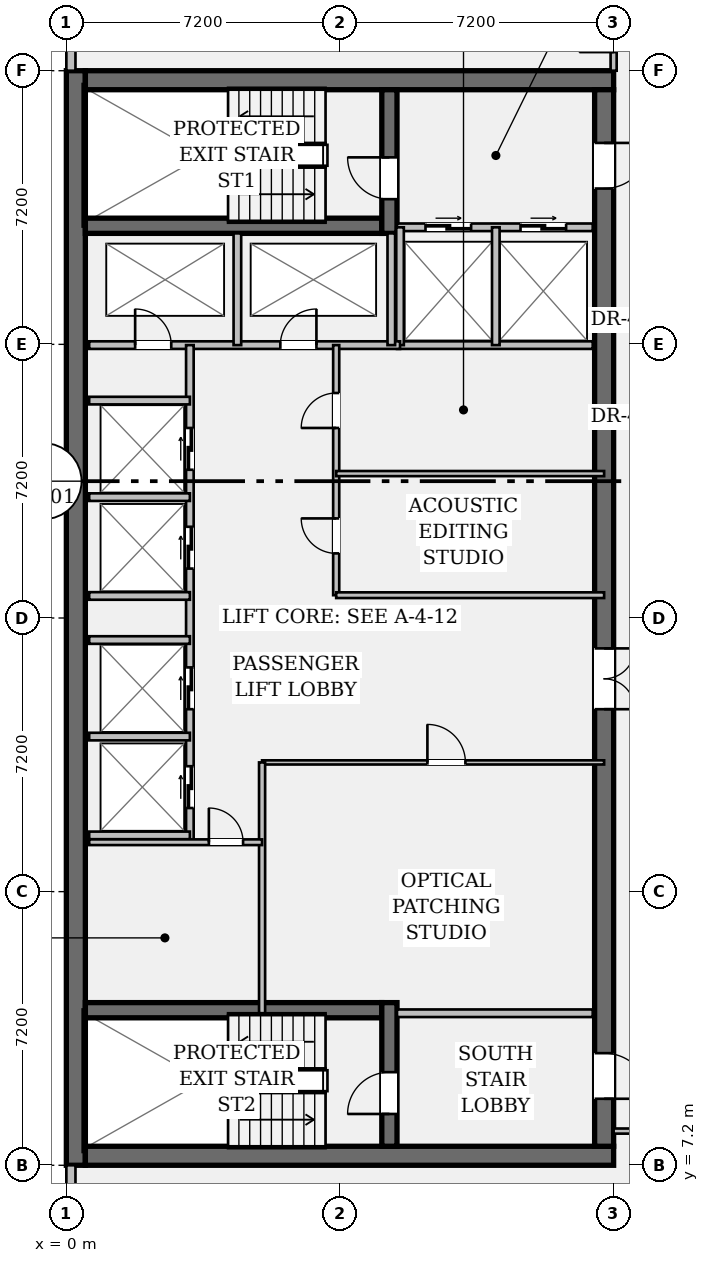
"""IFC4 building model, lengths in metres.
Left out: names, types, materials, properties, quantities, classifications, styles, units other than length and angle.
Written with IfcOpenShell. Run it as: python <this file> out.ifc"""

import sys

from ifc_helpers import new_model, si_unit, direction, frame, frame_2d, origin, place, context, subcontext, project, spatial, rectangle, extrude, element, fill, save


model = new_model("IFC4")
c1 = context("Model", 3, precision=1e-05, world=origin(), true_north=direction((0.0, 1.0)))
c2 = subcontext(c1, "Body", "Model", "MODEL_VIEW")
j1 = project(units=[si_unit("LENGTHUNIT", "METRE"), si_unit("PLANEANGLEUNIT", "RADIAN")], contexts=[c1])
p1 = place(None, origin())
s1 = spatial("IfcSite", under=j1, at=p1, CompositionType="ELEMENT")
p2 = place(p1, origin())
s2 = spatial("IfcBuilding", under=s1, at=p2, CompositionType="ELEMENT")
p3 = place(p2, frame((0.0, 0.0, 201.25)))
s3 = spatial("IfcBuildingStorey", under=s2, at=p3, CompositionType="ELEMENT", Elevation=201.25)
p4 = place(p3, frame((0.25, 7.2, 0.0), z_axis=(0.0, 0.0, 1.0), x_axis=(0.0, 1.0, 0.0)))
e1 = element("IfcWall", 1, at=p4, inside=s3, PredefinedType="SHEAR", context=c2, shape_type="SweptSolid", body=[
    extrude(rectangle(XDim=28.8, YDim=0.5, at=frame_2d((14.4, 0.0))), origin(), (0.0, 0.0, 1.0), 3.24),
])
for number, where, z_axis, x_axis in (
    (2, (0.5, 7.45, 0.0), (0.0, 0.0, 1.0), (1.0, 0.0, 0.0)),
    (3, (0.5, 35.75, 0.0), (0.0, 0.0, 1.0), (1.0, 0.0, 0.0)),
):
    element("IfcWall", number, at=place(p3, frame(where, z_axis=z_axis, x_axis=x_axis)), inside=s3, PredefinedType="SHEAR", context=c2, shape_type="SweptSolid", body=[
        extrude(rectangle(XDim=13.9, YDim=0.5, at=frame_2d((6.95, 0.0))), origin(), (0.0, 0.0, 1.0), 3.24),
    ])
p5 = place(p3, frame((14.15, 35.5, 0.0), z_axis=(0.0, 0.0, 1.0), x_axis=(0.0, -1.0, 0.0)))
e4 = element("IfcWall", 4, at=p5, inside=s3, PredefinedType="SHEAR", context=c2, shape_type="SweptSolid", body=[
    extrude(rectangle(XDim=27.8, YDim=0.5, at=frame_2d((13.9, 0.0))), origin(), (0.0, 0.0, 1.0), 3.24),
])
p6 = place(p5, frame((1.4, 0.0, 0.0)))
e5 = element("IfcOpeningElement", 5, at=p6, cuts=e4, PredefinedType="OPENING", context=c2, shape_type="SweptSolid", body=[
    extrude(rectangle(XDim=1.2, YDim=2.15, at=frame_2d((0.6, 1.075))), frame((0.0, 0.262, 0.0), z_axis=(0.0, -1.0, 0.0), x_axis=(1.0, 0.0, 0.0)), (0.0, 0.0, 1.0), 0.524),
])
p7 = place(p5, frame((25.35, 0.0, 0.0)))
e6 = element("IfcOpeningElement", 6, at=p7, cuts=e4, PredefinedType="OPENING", context=c2, shape_type="SweptSolid", body=[
    extrude(rectangle(XDim=1.2, YDim=2.15, at=frame_2d((0.6, 1.075))), frame((0.0, 0.262, 0.0), z_axis=(0.0, -1.0, 0.0), x_axis=(1.0, 0.0, 0.0)), (0.0, 0.0, 1.0), 0.524),
])
p8 = place(p5, frame((14.7, 0.0, 0.0)))
e7 = element("IfcOpeningElement", 7, at=p8, cuts=e4, PredefinedType="OPENING", context=c2, shape_type="SweptSolid", body=[
    extrude(rectangle(XDim=1.6, YDim=2.2, at=frame_2d((0.8, 1.1))), frame((0.0, 0.262, 0.0), z_axis=(0.0, -1.0, 0.0), x_axis=(1.0, 0.0, 0.0)), (0.0, 0.0, 1.0), 0.524),
])
for number, where, z_axis, x_axis in (
    (8, (0.5, 31.92, 0.0), (0.0, 0.0, 1.0), (1.0, 0.0, 0.0)),
    (9, (0.5, 11.28, 0.0), (0.0, 0.0, 1.0), (1.0, 0.0, 0.0)),
):
    element("IfcWall", number, at=place(p3, frame(where, z_axis=z_axis, x_axis=x_axis)), inside=s3, PredefinedType="SHEAR", context=c2, shape_type="SweptSolid", body=[
        extrude(rectangle(XDim=7.8, YDim=0.4, at=frame_2d((3.9, 0.0))), origin(), (0.0, 0.0, 1.0), 3.24),
    ])
p9 = place(p3, frame((8.5, 31.72, 0.0), z_axis=(0.0, 0.0, 1.0), x_axis=(0.0, 1.0, 0.0)))
e10 = element("IfcWall", 10, at=p9, inside=s3, PredefinedType="SHEAR", context=c2, shape_type="SweptSolid", body=[
    extrude(rectangle(XDim=3.78, YDim=0.4, at=frame_2d((1.89, 0.0))), origin(), (0.0, 0.0, 1.0), 3.24),
])
p10 = place(p9, frame((0.9, 0.0, 0.0)))
e11 = element("IfcOpeningElement", 11, at=p10, cuts=e10, PredefinedType="OPENING", context=c2, shape_type="SweptSolid", body=[
    extrude(rectangle(XDim=1.1, YDim=2.15, at=frame_2d((0.55, 1.075))), frame((0.0, 0.212, 0.0), z_axis=(0.0, -1.0, 0.0), x_axis=(1.0, 0.0, 0.0)), (0.0, 0.0, 1.0), 0.424),
])
p11 = place(p3, frame((8.5, 7.7, 0.0), z_axis=(0.0, 0.0, 1.0), x_axis=(0.0, 1.0, 0.0)))
e12 = element("IfcWall", 12, at=p11, inside=s3, PredefinedType="SHEAR", context=c2, shape_type="SweptSolid", body=[
    extrude(rectangle(XDim=3.78, YDim=0.4, at=frame_2d((1.89, 0.0))), origin(), (0.0, 0.0, 1.0), 3.24),
])
p12 = place(p11, frame((0.85, 0.0, 0.0)))
e13 = element("IfcOpeningElement", 13, at=p12, cuts=e12, PredefinedType="OPENING", context=c2, shape_type="SweptSolid", body=[
    extrude(rectangle(XDim=1.1, YDim=2.15, at=frame_2d((0.55, 1.075))), frame((0.0, 0.212, 0.0), z_axis=(0.0, -1.0, 0.0), x_axis=(1.0, 0.0, 0.0)), (0.0, 0.0, 1.0), 0.424),
])
for number, where, z_axis, x_axis in (
    (14, (0.12, 5.91, 0.0), (0.0, 0.0, 1.0), (0.0, 1.0, 0.0)),
    (15, (0.12, 36.0, 0.0), (0.0, 0.0, 1.0), (0.0, 1.0, 0.0)),
):
    element("IfcWall", number, at=place(p3, frame(where, z_axis=z_axis, x_axis=x_axis)), inside=s3, PredefinedType="STANDARD", context=c2, shape_type="SweptSolid", body=[
        extrude(rectangle(XDim=1.29, YDim=0.24, at=frame_2d((0.645, 0.0))), origin(), (0.0, 0.0, 1.0), 3.24),
    ])
p13 = place(p3, frame((8.7, 31.88, 0.0), z_axis=(0.0, 0.0, 1.0), x_axis=(1.0, 0.0, 0.0)))
e16 = element("IfcWall", 16, at=p13, inside=s3, PredefinedType="PARTITIONING", context=c2, shape_type="SweptSolid", body=[
    extrude(rectangle(XDim=5.15, YDim=0.2, at=frame_2d((2.575, 0.0))), origin(), (0.0, 0.0, 1.0), 3.24),
])
p14 = place(p13, frame((0.75, 0.0, 0.0)))
e17 = element("IfcOpeningElement", 17, at=p14, cuts=e16, PredefinedType="OPENING", context=c2, shape_type="SweptSolid", body=[
    extrude(rectangle(XDim=1.2, YDim=2.2, at=frame_2d((0.6, 1.1))), frame((0.0, 0.112, 0.0), z_axis=(0.0, -1.0, 0.0), x_axis=(1.0, 0.0, 0.0)), (0.0, 0.0, 1.0), 0.224),
])
p15 = place(p13, frame((3.25, 0.0, 0.0)))
e18 = element("IfcOpeningElement", 18, at=p15, cuts=e16, PredefinedType="OPENING", context=c2, shape_type="SweptSolid", body=[
    extrude(rectangle(XDim=1.2, YDim=2.2, at=frame_2d((0.6, 1.1))), frame((0.0, 0.112, 0.0), z_axis=(0.0, -1.0, 0.0), x_axis=(1.0, 0.0, 0.0)), (0.0, 0.0, 1.0), 0.224),
])
for number, where, z_axis, x_axis in (
    (19, (8.7, 11.2, 0.0), (0.0, 0.0, 1.0), (1.0, 0.0, 0.0)),
    (20, (8.7, 28.78, 0.0), (0.0, 0.0, 1.0), (1.0, 0.0, 0.0)),
):
    element("IfcWall", number, at=place(p3, frame(where, z_axis=z_axis, x_axis=x_axis)), inside=s3, PredefinedType="PARTITIONING", context=c2, shape_type="SweptSolid", body=[
        extrude(rectangle(XDim=5.15, YDim=0.2, at=frame_2d((2.575, 0.0))), origin(), (0.0, 0.0, 1.0), 3.24),
    ])
for number, where, z_axis, x_axis in (
    (21, (8.78, 28.78, 0.0), (0.0, 0.0, 1.0), (0.0, 1.0, 0.0)),
    (22, (11.3, 28.78, 0.0), (0.0, 0.0, 1.0), (0.0, 1.0, 0.0)),
):
    element("IfcWall", number, at=place(p3, frame(where, z_axis=z_axis, x_axis=x_axis)), inside=s3, PredefinedType="PARTITIONING", context=c2, shape_type="SweptSolid", body=[
        extrude(rectangle(XDim=3.1, YDim=0.2, at=frame_2d((1.55, 0.0))), origin(), (0.0, 0.0, 1.0), 3.24),
    ])
p16 = place(p3, frame((0.6, 28.78, 0.0), z_axis=(0.0, 0.0, 1.0), x_axis=(1.0, 0.0, 0.0)))
e23 = element("IfcWall", 23, at=p16, inside=s3, PredefinedType="PARTITIONING", context=c2, shape_type="SweptSolid", body=[
    extrude(rectangle(XDim=8.18, YDim=0.2, at=frame_2d((4.09, 0.0))), origin(), (0.0, 0.0, 1.0), 3.24),
])
p17 = place(p16, frame((1.21, 0.0, 0.0)))
e24 = element("IfcOpeningElement", 24, at=p17, cuts=e23, PredefinedType="OPENING", context=c2, shape_type="SweptSolid", body=[
    extrude(rectangle(XDim=0.95, YDim=2.15, at=frame_2d((0.475, 1.075))), frame((0.0, 0.112, 0.0), z_axis=(0.0, -1.0, 0.0), x_axis=(1.0, 0.0, 0.0)), (0.0, 0.0, 1.0), 0.224),
])
p18 = place(p16, frame((5.03, 0.0, 0.0)))
e25 = element("IfcOpeningElement", 25, at=p18, cuts=e23, PredefinedType="OPENING", context=c2, shape_type="SweptSolid", body=[
    extrude(rectangle(XDim=0.95, YDim=2.15, at=frame_2d((0.475, 1.075))), frame((0.0, 0.112, 0.0), z_axis=(0.0, -1.0, 0.0), x_axis=(1.0, 0.0, 0.0)), (0.0, 0.0, 1.0), 0.224),
])
for number, where, z_axis, x_axis in (
    (26, (4.5, 28.78, 0.0), (0.0, 0.0, 1.0), (0.0, 1.0, 0.0)),
    (27, (8.55, 28.78, 0.0), (0.0, 0.0, 1.0), (0.0, 1.0, 0.0)),
):
    element("IfcWall", number, at=place(p3, frame(where, z_axis=z_axis, x_axis=x_axis)), inside=s3, PredefinedType="PARTITIONING", context=c2, shape_type="SweptSolid", body=[
        extrude(rectangle(XDim=2.94, YDim=0.2, at=frame_2d((1.47, 0.0))), origin(), (0.0, 0.0, 1.0), 3.24),
    ])
p19 = place(p3, frame((3.25, 15.7, 0.0), z_axis=(0.0, 0.0, 1.0), x_axis=(0.0, 1.0, 0.0)))
e28 = element("IfcWall", 28, at=p19, inside=s3, PredefinedType="PARTITIONING", context=c2, shape_type="SweptSolid", body=[
    extrude(rectangle(XDim=13.08, YDim=0.2, at=frame_2d((6.54, 0.0))), origin(), (0.0, 0.0, 1.0), 3.24),
])
p20 = place(p19, frame((0.9, 0.0, 0.0)))
e29 = element("IfcOpeningElement", 29, at=p20, cuts=e28, PredefinedType="OPENING", context=c2, shape_type="SweptSolid", body=[
    extrude(rectangle(XDim=1.1, YDim=2.2, at=frame_2d((0.55, 1.1))), frame((0.0, 0.112, 0.0), z_axis=(0.0, -1.0, 0.0), x_axis=(1.0, 0.0, 0.0)), (0.0, 0.0, 1.0), 0.224),
])
p21 = place(p19, frame((3.5, 0.0, 0.0)))
e30 = element("IfcOpeningElement", 30, at=p21, cuts=e28, PredefinedType="OPENING", context=c2, shape_type="SweptSolid", body=[
    extrude(rectangle(XDim=1.1, YDim=2.2, at=frame_2d((0.55, 1.1))), frame((0.0, 0.112, 0.0), z_axis=(0.0, -1.0, 0.0), x_axis=(1.0, 0.0, 0.0)), (0.0, 0.0, 1.0), 0.224),
])
p22 = place(p19, frame((7.2, 0.0, 0.0)))
e31 = element("IfcOpeningElement", 31, at=p22, cuts=e28, PredefinedType="OPENING", context=c2, shape_type="SweptSolid", body=[
    extrude(rectangle(XDim=1.1, YDim=2.2, at=frame_2d((0.55, 1.1))), frame((0.0, 0.112, 0.0), z_axis=(0.0, -1.0, 0.0), x_axis=(1.0, 0.0, 0.0)), (0.0, 0.0, 1.0), 0.224),
])
p23 = place(p19, frame((9.8, 0.0, 0.0)))
e32 = element("IfcOpeningElement", 32, at=p23, cuts=e28, PredefinedType="OPENING", context=c2, shape_type="SweptSolid", body=[
    extrude(rectangle(XDim=1.1, YDim=2.2, at=frame_2d((0.55, 1.1))), frame((0.0, 0.112, 0.0), z_axis=(0.0, -1.0, 0.0), x_axis=(1.0, 0.0, 0.0)), (0.0, 0.0, 1.0), 0.224),
])
for number, where, z_axis, x_axis in (
    (33, (0.6, 15.88, 0.0), (0.0, 0.0, 1.0), (1.0, 0.0, 0.0)),
    (34, (0.6, 18.48, 0.0), (0.0, 0.0, 1.0), (1.0, 0.0, 0.0)),
    (35, (0.6, 22.18, 0.0), (0.0, 0.0, 1.0), (1.0, 0.0, 0.0)),
    (36, (0.6, 24.78, 0.0), (0.0, 0.0, 1.0), (1.0, 0.0, 0.0)),
    (37, (0.6, 21.02, 0.0), (0.0, 0.0, 1.0), (1.0, 0.0, 0.0)),
    (38, (0.6, 27.32, 0.0), (0.0, 0.0, 1.0), (1.0, 0.0, 0.0)),
):
    element("IfcWall", number, at=place(p3, frame(where, z_axis=z_axis, x_axis=x_axis)), inside=s3, PredefinedType="PARTITIONING", context=c2, shape_type="SweptSolid", body=[
        extrude(rectangle(XDim=2.65, YDim=0.2, at=frame_2d((1.325, 0.0))), origin(), (0.0, 0.0, 1.0), 3.24),
    ])
p24 = place(p3, frame((7.1, 22.2, 0.0), z_axis=(0.0, 0.0, 1.0), x_axis=(0.0, 1.0, 0.0)))
e39 = element("IfcWall", 39, at=p24, inside=s3, PredefinedType="PARTITIONING", context=c2, shape_type="SweptSolid", body=[
    extrude(rectangle(XDim=6.58, YDim=0.16, at=frame_2d((3.29, 0.0))), origin(), (0.0, 0.0, 1.0), 3.24),
])
p25 = place(p24, frame((1.1, 0.0, 0.0)))
e40 = element("IfcOpeningElement", 40, at=p25, cuts=e39, PredefinedType="OPENING", context=c2, shape_type="SweptSolid", body=[
    extrude(rectangle(XDim=0.92, YDim=2.15, at=frame_2d((0.46, 1.075))), frame((0.0, 0.092, 0.0), z_axis=(0.0, -1.0, 0.0), x_axis=(1.0, 0.0, 0.0)), (0.0, 0.0, 1.0), 0.184),
])
p26 = place(p24, frame((4.4, 0.0, 0.0)))
e41 = element("IfcOpeningElement", 41, at=p26, cuts=e39, PredefinedType="OPENING", context=c2, shape_type="SweptSolid", body=[
    extrude(rectangle(XDim=0.92, YDim=2.15, at=frame_2d((0.46, 1.075))), frame((0.0, 0.092, 0.0), z_axis=(0.0, -1.0, 0.0), x_axis=(1.0, 0.0, 0.0)), (0.0, 0.0, 1.0), 0.184),
])
p27 = place(p3, frame((7.1, 22.2, 0.0), z_axis=(0.0, 0.0, 1.0), x_axis=(1.0, 0.0, 0.0)))
e42 = element("IfcWall", 42, at=p27, inside=s3, PredefinedType="PARTITIONING", context=c2, shape_type="SweptSolid", body=[
    extrude(rectangle(XDim=7.05, YDim=0.15, at=frame_2d((3.525, 0.0))), origin(), (0.0, 0.0, 1.0), 3.24),
])
p28 = place(p3, frame((7.1, 25.4, 0.0), z_axis=(0.0, 0.0, 1.0), x_axis=(1.0, 0.0, 0.0)))
e43 = element("IfcWall", 43, at=p28, inside=s3, PredefinedType="PARTITIONING", context=c2, shape_type="SweptSolid", body=[
    extrude(rectangle(XDim=7.05, YDim=0.135, at=frame_2d((3.525, 0.0))), origin(), (0.0, 0.0, 1.0), 3.24),
])
p29 = place(p3, frame((5.15, 17.8, 0.0), z_axis=(0.0, 0.0, 1.0), x_axis=(1.0, 0.0, 0.0)))
e44 = element("IfcWall", 44, at=p29, inside=s3, PredefinedType="PARTITIONING", context=c2, shape_type="SweptSolid", body=[
    extrude(rectangle(XDim=9.0, YDim=0.11, at=frame_2d((4.5, 0.0))), origin(), (0.0, 0.0, 1.0), 3.24),
])
p30 = place(p29, frame((4.35, 0.0, 0.0)))
e45 = element("IfcOpeningElement", 45, at=p30, cuts=e44, PredefinedType="OPENING", context=c2, shape_type="SweptSolid", body=[
    extrude(rectangle(XDim=1.0, YDim=2.15, at=frame_2d((0.5, 1.075))), frame((0.0, 0.067, 0.0), z_axis=(0.0, -1.0, 0.0), x_axis=(1.0, 0.0, 0.0)), (0.0, 0.0, 1.0), 0.134),
])
p31 = place(p3, frame((5.15, 11.2, 0.0), z_axis=(0.0, 0.0, 1.0), x_axis=(0.0, 1.0, 0.0)))
e46 = element("IfcWall", 46, at=p31, inside=s3, PredefinedType="PARTITIONING", context=c2, shape_type="SweptSolid", body=[
    extrude(rectangle(XDim=6.6, YDim=0.16, at=frame_2d((3.3, 0.0))), origin(), (0.0, 0.0, 1.0), 3.24),
])
p32 = place(p3, frame((0.6, 15.7, 0.0), z_axis=(0.0, 0.0, 1.0), x_axis=(1.0, 0.0, 0.0)))
e47 = element("IfcWall", 47, at=p32, inside=s3, PredefinedType="PARTITIONING", context=c2, shape_type="SweptSolid", body=[
    extrude(rectangle(XDim=4.55, YDim=0.15, at=frame_2d((2.275, 0.0))), origin(), (0.0, 0.0, 1.0), 3.24),
])
p33 = place(p32, frame((3.15, 0.0, 0.0)))
e48 = element("IfcOpeningElement", 48, at=p33, cuts=e47, PredefinedType="OPENING", context=c2, shape_type="SweptSolid", body=[
    extrude(rectangle(XDim=0.9, YDim=2.15, at=frame_2d((0.45, 1.075))), frame((0.0, 0.087, 0.0), z_axis=(0.0, -1.0, 0.0), x_axis=(1.0, 0.0, 0.0)), (0.0, 0.0, 1.0), 0.174),
])
p34 = place(p3, frame((14.4, 8.1, 0.0), z_axis=(0.0, 0.0, 1.0), x_axis=(1.0, 0.0, 0.0)))
e49 = element("IfcWall", 49, at=p34, inside=s3, PredefinedType="PARTITIONING", context=c2, shape_type="SweptSolid", body=[
    extrude(rectangle(XDim=2.95, YDim=0.135, at=frame_2d((1.475, 0.0))), origin(), (0.0, 0.0, 1.0), 2.808),
])
p35 = place(p34, frame((0.95, 0.0, 0.0)))
e50 = element("IfcOpeningElement", 50, at=p35, cuts=e49, PredefinedType="OPENING", context=c2, shape_type="SweptSolid", body=[
    extrude(rectangle(XDim=0.92, YDim=2.15, at=frame_2d((0.46, 1.075))), frame((0.0, 0.08, 0.0), z_axis=(0.0, -1.0, 0.0), x_axis=(1.0, 0.0, 0.0)), (0.0, 0.0, 1.0), 0.159),
])
p36 = place(p3, frame((14.4, 36.0, 0.0), z_axis=(0.0, 0.0, 1.0), x_axis=(0.0, 1.0, 0.0)))
e51 = element("IfcWall", 51, at=p36, inside=s3, PredefinedType="PARTITIONING", context=c2, shape_type="SweptSolid", body=[
    extrude(rectangle(XDim=3.88, YDim=0.16, at=frame_2d((1.94, 0.0))), origin(), (0.0, 0.0, 1.0), 2.613),
])
p37 = place(p36, frame((0.49, 0.0, 0.0)))
e52 = element("IfcOpeningElement", 52, at=p37, cuts=e51, PredefinedType="OPENING", context=c2, shape_type="SweptSolid", body=[
    extrude(rectangle(XDim=0.9, YDim=2.15, at=frame_2d((0.45, 1.075))), frame((0.0, 0.092, 0.0), z_axis=(0.0, -1.0, 0.0), x_axis=(1.0, 0.0, 0.0)), (0.0, 0.0, 1.0), 0.184),
])
p38 = place(p10, origin())
e53 = element("IfcDoor", 53, at=p38, inside=s3, OperationType="SINGLE_SWING_RIGHT", PredefinedType="DOOR", context=c2, shape_type="SweptSolid", body=[
    extrude(rectangle(XDim=1.1, YDim=2.15, at=frame_2d((0.55, 1.075))), frame((0.0, 0.025, 0.0), z_axis=(0.0, -1.0, 0.0), x_axis=(1.0, 0.0, 0.0)), (0.0, 0.0, 1.0), 0.05),
])
fill(e11, e53)
p39 = place(p6, origin())
e54 = element("IfcDoor", 54, at=p39, inside=s3, OperationType="SINGLE_SWING_LEFT", PredefinedType="DOOR", context=c2, shape_type="SweptSolid", body=[
    extrude(rectangle(XDim=1.2, YDim=2.15, at=frame_2d((0.6, 1.075))), frame((0.0, 0.025, 0.0), z_axis=(0.0, -1.0, 0.0), x_axis=(1.0, 0.0, 0.0)), (0.0, 0.0, 1.0), 0.05),
])
fill(e5, e54)
p40 = place(p12, origin())
e55 = element("IfcDoor", 55, at=p40, inside=s3, OperationType="SINGLE_SWING_LEFT", PredefinedType="DOOR", context=c2, shape_type="SweptSolid", body=[
    extrude(rectangle(XDim=1.1, YDim=2.15, at=frame_2d((0.55, 1.075))), frame((0.0, 0.025, 0.0), z_axis=(0.0, -1.0, 0.0), x_axis=(1.0, 0.0, 0.0)), (0.0, 0.0, 1.0), 0.05),
])
fill(e13, e55)
p41 = place(p7, origin())
e56 = element("IfcDoor", 56, at=p41, inside=s3, OperationType="SINGLE_SWING_RIGHT", PredefinedType="DOOR", context=c2, shape_type="SweptSolid", body=[
    extrude(rectangle(XDim=1.2, YDim=2.15, at=frame_2d((0.6, 1.075))), frame((0.0, 0.025, 0.0), z_axis=(0.0, -1.0, 0.0), x_axis=(1.0, 0.0, 0.0)), (0.0, 0.0, 1.0), 0.05),
])
fill(e6, e56)
p42 = place(p14, origin())
e57 = element("IfcDoor", 57, at=p42, inside=s3, OperationType="DOUBLE_DOOR_SLIDING", PredefinedType="DOOR", context=c2, shape_type="SweptSolid", body=[
    extrude(rectangle(XDim=1.2, YDim=2.2, at=frame_2d((0.6, 1.1))), frame((0.0, 0.025, 0.0), z_axis=(0.0, -1.0, 0.0), x_axis=(1.0, 0.0, 0.0)), (0.0, 0.0, 1.0), 0.05),
])
fill(e17, e57)
p43 = place(p15, origin())
e58 = element("IfcDoor", 58, at=p43, inside=s3, OperationType="DOUBLE_DOOR_SLIDING", PredefinedType="DOOR", context=c2, shape_type="SweptSolid", body=[
    extrude(rectangle(XDim=1.2, YDim=2.2, at=frame_2d((0.6, 1.1))), frame((0.0, 0.025, 0.0), z_axis=(0.0, -1.0, 0.0), x_axis=(1.0, 0.0, 0.0)), (0.0, 0.0, 1.0), 0.05),
])
fill(e18, e58)
p44 = place(p17, origin())
e59 = element("IfcDoor", 59, at=p44, inside=s3, OperationType="SINGLE_SWING_LEFT", PredefinedType="DOOR", context=c2, shape_type="SweptSolid", body=[
    extrude(rectangle(XDim=0.95, YDim=2.15, at=frame_2d((0.475, 1.075))), frame((0.0, 0.025, 0.0), z_axis=(0.0, -1.0, 0.0), x_axis=(1.0, 0.0, 0.0)), (0.0, 0.0, 1.0), 0.05),
])
fill(e24, e59)
p45 = place(p18, origin())
e60 = element("IfcDoor", 60, at=p45, inside=s3, OperationType="SINGLE_SWING_RIGHT", PredefinedType="DOOR", context=c2, shape_type="SweptSolid", body=[
    extrude(rectangle(XDim=0.95, YDim=2.15, at=frame_2d((0.475, 1.075))), frame((0.0, 0.025, 0.0), z_axis=(0.0, -1.0, 0.0), x_axis=(1.0, 0.0, 0.0)), (0.0, 0.0, 1.0), 0.05),
])
fill(e25, e60)
p46 = place(p8, origin())
e61 = element("IfcDoor", 61, at=p46, inside=s3, OperationType="DOUBLE_DOOR_SINGLE_SWING", PredefinedType="DOOR", context=c2, shape_type="SweptSolid", body=[
    extrude(rectangle(XDim=1.6, YDim=2.2, at=frame_2d((0.8, 1.1))), frame((0.0, 0.025, 0.0), z_axis=(0.0, -1.0, 0.0), x_axis=(1.0, 0.0, 0.0)), (0.0, 0.0, 1.0), 0.05),
])
fill(e7, e61)
p47 = place(p20, origin())
e62 = element("IfcDoor", 62, at=p47, inside=s3, OperationType="DOUBLE_DOOR_SLIDING", PredefinedType="DOOR", context=c2, shape_type="SweptSolid", body=[
    extrude(rectangle(XDim=1.1, YDim=2.2, at=frame_2d((0.55, 1.1))), frame((0.0, 0.025, 0.0), z_axis=(0.0, -1.0, 0.0), x_axis=(1.0, 0.0, 0.0)), (0.0, 0.0, 1.0), 0.05),
])
fill(e29, e62)
p48 = place(p21, origin())
e63 = element("IfcDoor", 63, at=p48, inside=s3, OperationType="DOUBLE_DOOR_SLIDING", PredefinedType="DOOR", context=c2, shape_type="SweptSolid", body=[
    extrude(rectangle(XDim=1.1, YDim=2.2, at=frame_2d((0.55, 1.1))), frame((0.0, 0.025, 0.0), z_axis=(0.0, -1.0, 0.0), x_axis=(1.0, 0.0, 0.0)), (0.0, 0.0, 1.0), 0.05),
])
fill(e30, e63)
p49 = place(p22, origin())
e64 = element("IfcDoor", 64, at=p49, inside=s3, OperationType="DOUBLE_DOOR_SLIDING", PredefinedType="DOOR", context=c2, shape_type="SweptSolid", body=[
    extrude(rectangle(XDim=1.1, YDim=2.2, at=frame_2d((0.55, 1.1))), frame((0.0, 0.025, 0.0), z_axis=(0.0, -1.0, 0.0), x_axis=(1.0, 0.0, 0.0)), (0.0, 0.0, 1.0), 0.05),
])
fill(e31, e64)
p50 = place(p23, origin())
e65 = element("IfcDoor", 65, at=p50, inside=s3, OperationType="DOUBLE_DOOR_SLIDING", PredefinedType="DOOR", context=c2, shape_type="SweptSolid", body=[
    extrude(rectangle(XDim=1.1, YDim=2.2, at=frame_2d((0.55, 1.1))), frame((0.0, 0.025, 0.0), z_axis=(0.0, -1.0, 0.0), x_axis=(1.0, 0.0, 0.0)), (0.0, 0.0, 1.0), 0.05),
])
fill(e32, e65)
p51 = place(p25, origin())
e66 = element("IfcDoor", 66, at=p51, inside=s3, OperationType="SINGLE_SWING_RIGHT", PredefinedType="DOOR", context=c2, shape_type="SweptSolid", body=[
    extrude(rectangle(XDim=0.92, YDim=2.15, at=frame_2d((0.46, 1.075))), frame((0.0, 0.025, 0.0), z_axis=(0.0, -1.0, 0.0), x_axis=(1.0, 0.0, 0.0)), (0.0, 0.0, 1.0), 0.05),
])
fill(e40, e66)
p52 = place(p26, origin())
e67 = element("IfcDoor", 67, at=p52, inside=s3, OperationType="SINGLE_SWING_LEFT", PredefinedType="DOOR", context=c2, shape_type="SweptSolid", body=[
    extrude(rectangle(XDim=0.92, YDim=2.15, at=frame_2d((0.46, 1.075))), frame((0.0, 0.025, 0.0), z_axis=(0.0, -1.0, 0.0), x_axis=(1.0, 0.0, 0.0)), (0.0, 0.0, 1.0), 0.05),
])
fill(e41, e67)
p53 = place(p30, origin())
e68 = element("IfcDoor", 68, at=p53, inside=s3, OperationType="SINGLE_SWING_LEFT", PredefinedType="DOOR", context=c2, shape_type="SweptSolid", body=[
    extrude(rectangle(XDim=1.0, YDim=2.15, at=frame_2d((0.5, 1.075))), frame((0.0, 0.025, 0.0), z_axis=(0.0, -1.0, 0.0), x_axis=(1.0, 0.0, 0.0)), (0.0, 0.0, 1.0), 0.05),
])
fill(e45, e68)
p54 = place(p33, origin())
e69 = element("IfcDoor", 69, at=p54, inside=s3, OperationType="SINGLE_SWING_LEFT", PredefinedType="DOOR", context=c2, shape_type="SweptSolid", body=[
    extrude(rectangle(XDim=0.9, YDim=2.15, at=frame_2d((0.45, 1.075))), frame((0.0, 0.025, 0.0), z_axis=(0.0, -1.0, 0.0), x_axis=(1.0, 0.0, 0.0)), (0.0, 0.0, 1.0), 0.05),
])
fill(e48, e69)
save(model, sys.argv[1])
